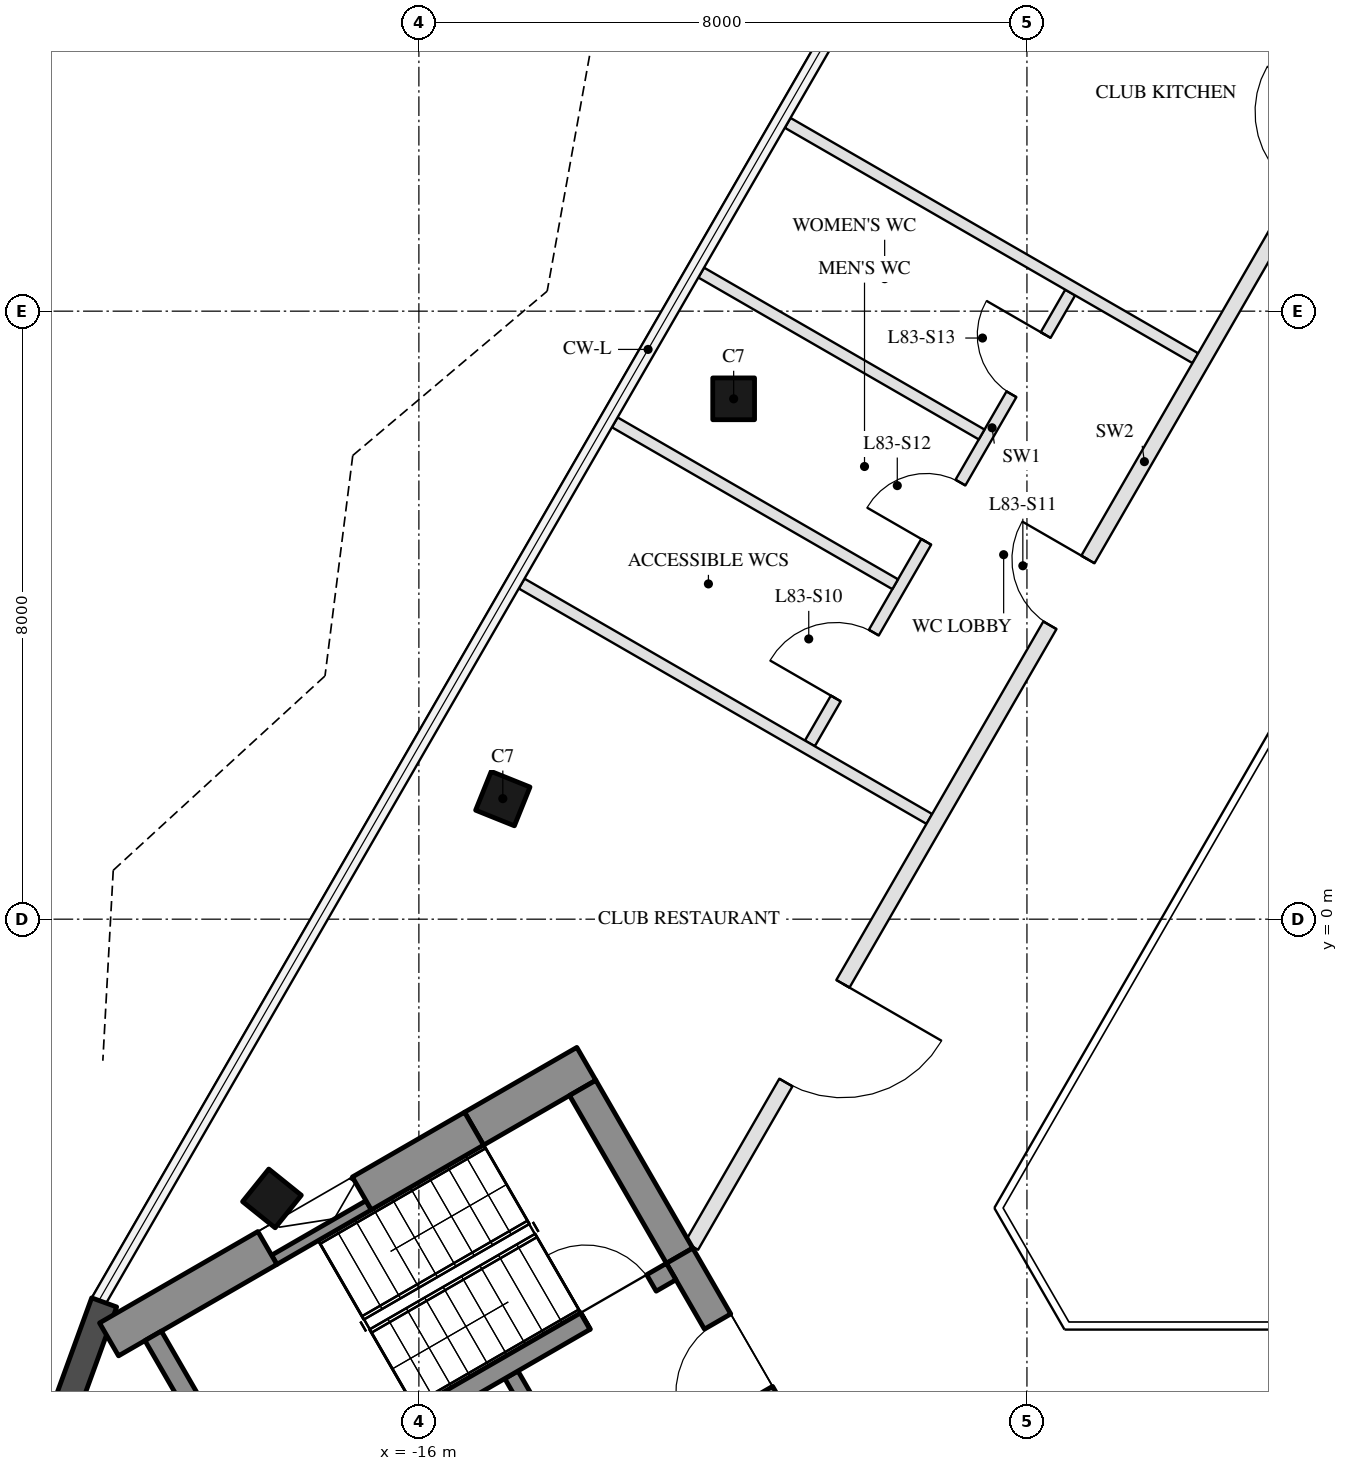
"""IFC4 building model, lengths in metres.
Left out: names, types, materials, properties, quantities, classifications, styles, units other than length and angle.
Written with IfcOpenShell. Run it as: python <this file> out.ifc"""

import sys

from ifc_helpers import new_model, si_unit, direction, frame, frame_2d, origin, origin_2d, place, context, subcontext, project, spatial, rectangle, hollow_rectangle, extrude, boolean, halfspace, element, fill, save


model = new_model("IFC4")
c1 = context("Model", 3, precision=1e-05, world=origin(), true_north=direction((0.0, 1.0)))
c2 = subcontext(c1, "Body", "Model", "MODEL_VIEW")
j1 = project(units=[si_unit("LENGTHUNIT", "METRE"), si_unit("PLANEANGLEUNIT", "RADIAN")], contexts=[c1])
p1 = place(None, origin())
s1 = spatial("IfcSite", under=j1, at=p1, CompositionType="ELEMENT")
p2 = place(p1, origin())
s2 = spatial("IfcBuilding", under=s1, at=p2, CompositionType="ELEMENT")
p3 = place(p2, frame((0.0, 0.0, 331.8)))
s3 = spatial("IfcBuildingStorey", under=s2, at=p3, CompositionType="ELEMENT", Elevation=331.8)
p4 = place(p3, frame((-8.822, 12.107, 0.0), z_axis=(0.057738040202, -0.073705749506, 0.995607242442), x_axis=(0.501061537175, 0.864705350939, 0.034957002453)))
e1 = element("IfcColumn", 1, at=p4, inside=s3, PredefinedType="COLUMN", context=c2, shape_type="SweptSolid", body=[
    boolean("DIFFERENCE", boolean("DIFFERENCE", extrude(hollow_rectangle(XDim=0.55, YDim=0.55, WallThickness=0.025, at=origin_2d()), origin(), (0.0, 0.0, 1.0), 6.529), halfspace(frame((0.0, 0.0, 0.016), z_axis=(0.0, 0.0, 1.0), x_axis=(1.0, 0.0, 0.0)), True)), halfspace(frame((0.0, 0.0, 6.509), z_axis=(0.0, 0.0, 1.0), x_axis=(1.0, 0.0, 0.0)), False)),
])
p5 = place(p3, frame((-11.859, 6.847, 0.0), z_axis=(0.075247573053, -0.043479701585, 0.99621650172), x_axis=(-0.500351454226, -0.865822396472, 4.550396e-06)))
e2 = element("IfcColumn", 2, at=p5, inside=s3, PredefinedType="COLUMN", context=c2, shape_type="SweptSolid", body=[
    boolean("DIFFERENCE", boolean("DIFFERENCE", extrude(hollow_rectangle(XDim=0.55, YDim=0.55, WallThickness=0.025, at=origin_2d()), origin(), (0.0, 0.0, 1.0), 6.525), halfspace(frame((0.0, 0.0, 0.015), z_axis=(0.0, 0.0, 1.0), x_axis=(1.0, 0.0, 0.0)), True)), halfspace(frame((0.0, 0.0, 6.506), z_axis=(0.0, 0.0, 1.0), x_axis=(1.0, 0.0, 0.0)), False)),
])
p6 = place(p3, frame((-14.896, 1.586, 0.0), z_axis=(0.092702425399, -0.013163071295, 0.995606847043), x_axis=(-0.498429944547, -0.86622490994, 0.034957056199)))
e3 = element("IfcColumn", 3, at=p6, inside=s3, PredefinedType="COLUMN", context=c2, shape_type="SweptSolid", body=[
    boolean("DIFFERENCE", boolean("DIFFERENCE", extrude(hollow_rectangle(XDim=0.55, YDim=0.55, WallThickness=0.025, at=origin_2d()), origin(), (0.0, 0.0, 1.0), 6.529), halfspace(frame((0.0, 0.0, 0.016), z_axis=(0.0, 0.0, 1.0), x_axis=(1.0, 0.0, 0.0)), True)), halfspace(frame((0.0, 0.0, 6.509), z_axis=(0.0, 0.0, 1.0), x_axis=(1.0, 0.0, 0.0)), False)),
])
p7 = place(p3, frame((-17.933, -3.674, 0.0), z_axis=(0.110001598566, 0.017095599641, 0.993784377411), x_axis=(-0.496031401637, -0.865495011969, 0.069794217853)))
e4 = element("IfcColumn", 4, at=p7, inside=s3, PredefinedType="COLUMN", context=c2, shape_type="SweptSolid", body=[
    boolean("DIFFERENCE", boolean("DIFFERENCE", extrude(hollow_rectangle(XDim=0.55, YDim=0.55, WallThickness=0.025, at=origin_2d()), origin(), (0.0, 0.0, 1.0), 6.541), halfspace(frame((0.0, 0.0, 0.018), z_axis=(0.0, 0.0, 1.0), x_axis=(1.0, 0.0, 0.0)), True)), halfspace(frame((0.0, 0.0, 6.517), z_axis=(0.0, 0.0, 1.0), x_axis=(1.0, 0.0, 0.0)), False)),
])
p8 = place(p3, frame((-20.14, -5.042, 0.0), z_axis=(0.0, 0.0, 1.0), x_axis=(-0.341943264121, -0.939720598967, 0.0)))
e5 = element("IfcWall", 5, at=p8, inside=s3, PredefinedType="SOLIDWALL", context=c2, shape_type="SweptSolid", body=[
    extrude(rectangle(XDim=1.469, YDim=0.35, at=frame_2d((0.734, 0.0))), origin(), (0.0, 0.0, 1.0), 6.25),
])
p9 = place(p3, frame((-16.66, -3.765, 0.0), z_axis=(0.0, 0.0, 1.0), x_axis=(-0.866077922096, -0.499909024581, 0.0)))
e6 = element("IfcWall", 6, at=p9, inside=s3, PredefinedType="SHEAR", context=c2, shape_type="SweptSolid", body=[
    extrude(rectangle(XDim=1.435, YDim=0.14, at=frame_2d((0.717, 0.0))), origin(), (0.0, 0.0, 1.0), 6.25),
])
p10 = place(p3, frame((-17.993, -4.326, 0.0), z_axis=(0.0, 0.0, 1.0), x_axis=(-0.866030114221, -0.499991841196, 0.0)))
e7 = element("IfcWall", 7, at=p10, inside=s3, PredefinedType="SHEAR", context=c2, shape_type="SweptSolid", body=[
    extrude(rectangle(XDim=2.406, YDim=0.5, at=frame_2d((1.203, 0.0))), origin(), (0.0, 0.0, 1.0), 6.25),
])
p11 = place(p3, frame((-19.496, -5.482, 0.0), z_axis=(0.0, 0.0, 1.0), x_axis=(0.499990435942, -0.866030925526, 0.0)))
e8 = element("IfcWall", 8, at=p11, inside=s3, PredefinedType="SHEAR", context=c2, shape_type="SweptSolid", body=[
    extrude(rectangle(XDim=2.55, YDim=0.25, at=frame_2d((1.275, 0.0))), origin(), (0.0, 0.0, 1.0), 6.25),
])
p12 = place(p3, frame((-14.783, -5.995, 0.0), z_axis=(0.0, 0.0, 1.0), x_axis=(0.49994636267, -0.866056369097, 0.0)))
e9 = element("IfcWall", 9, at=p12, inside=s3, PredefinedType="SHEAR", context=c2, shape_type="SweptSolid", body=[
    extrude(rectangle(XDim=2.8, YDim=0.2, at=frame_2d((1.4, 0.0))), origin(), (0.0, 0.0, 1.0), 6.25),
])
p13 = place(p12, frame((0.7, 0.0, 0.0)))
e10 = element("IfcOpeningElement", 10, at=p13, cuts=e9, PredefinedType="OPENING", context=c2, shape_type="SweptSolid", body=[
    extrude(rectangle(XDim=1.2, YDim=2.1, at=frame_2d((0.6, 1.05))), frame((0.0, 0.11, 0.0), z_axis=(0.0, -1.0, 0.0), x_axis=(1.0, 0.0, 0.0)), (0.0, 0.0, 1.0), 0.22),
])
p14 = place(p3, frame((-13.797, -1.903, 0.0), z_axis=(0.0, 0.0, 1.0), x_axis=(-0.866033076574, -0.499986710104, 0.0)))
e11 = element("IfcWall", 11, at=p14, inside=s3, PredefinedType="SHEAR", context=c2, shape_type="SweptSolid", body=[
    extrude(rectangle(XDim=1.706, YDim=0.5, at=frame_2d((0.853, 0.0))), origin(), (0.0, 0.0, 1.0), 6.25),
])
p15 = place(p3, frame((-15.274, -2.756, 0.0), z_axis=(0.0, 0.0, 1.0), x_axis=(-0.866040105854, -0.499974534403, 0.0)))
e12 = element("IfcWall", 12, at=p15, inside=s3, PredefinedType="SHEAR", context=c2, shape_type="SweptSolid", body=[
    extrude(rectangle(XDim=1.705, YDim=0.5, at=frame_2d((0.852, 0.0))), origin(), (0.0, 0.0, 1.0), 6.25),
])
p16 = place(p3, frame((-13.845, -2.22, 0.0), z_axis=(0.0, 0.0, 1.0), x_axis=(0.500062241894, -0.865989465428, 0.0)))
e13 = element("IfcWall", 13, at=p16, inside=s3, PredefinedType="SHEAR", context=c2, shape_type="SweptSolid", body=[
    extrude(rectangle(XDim=2.55, YDim=0.4, at=frame_2d((1.275, 0.0))), origin(), (0.0, 0.0, 1.0), 6.25),
])
p17 = place(p3, frame((-12.57, -4.428, 0.0), z_axis=(0.0, 0.0, 1.0), x_axis=(0.499984378957, -0.86603442241, 0.0)))
e14 = element("IfcWall", 14, at=p17, inside=s3, PredefinedType="SHEAR", context=c2, shape_type="SweptSolid", body=[
    extrude(rectangle(XDim=7.45, YDim=0.4, at=frame_2d((3.725, 0.0))), origin(), (0.0, 0.0, 1.0), 6.25),
])
p18 = place(p17, frame((1.0, 0.0, 0.0)))
e15 = element("IfcOpeningElement", 15, at=p18, cuts=e14, PredefinedType="OPENING", context=c2, shape_type="SweptSolid", body=[
    extrude(rectangle(XDim=1.1, YDim=2.1, at=frame_2d((0.55, 1.05))), frame((0.0, 0.21, 0.0), z_axis=(0.0, -1.0, 0.0), x_axis=(1.0, 0.0, 0.0)), (0.0, 0.0, 1.0), 0.42),
])
p19 = place(p17, frame((3.3, 0.0, 0.0)))
e16 = element("IfcOpeningElement", 16, at=p19, cuts=e14, PredefinedType="OPENING", context=c2, shape_type="SweptSolid", body=[
    extrude(rectangle(XDim=1.4, YDim=2.1, at=frame_2d((0.7, 1.05))), frame((0.0, 0.21, 0.0), z_axis=(0.0, -1.0, 0.0), x_axis=(1.0, 0.0, 0.0)), (0.0, 0.0, 1.0), 0.42),
])
p20 = place(p3, frame((-12.681, -4.636, 0.0), z_axis=(0.0, 0.0, 1.0), x_axis=(-0.86601437931, -0.500019094464, 0.0)))
e17 = element("IfcWall", 17, at=p20, inside=s3, PredefinedType="SHEAR", context=c2, shape_type="SweptSolid", body=[
    extrude(rectangle(XDim=1.306, YDim=0.25, at=frame_2d((0.653, 0.0))), origin(), (0.0, 0.0, 1.0), 6.25),
])
p21 = place(p20, frame((0.3, 0.0, 0.0)))
e18 = element("IfcOpeningElement", 18, at=p21, cuts=e17, PredefinedType="OPENING", context=c2, shape_type="SweptSolid", body=[
    extrude(rectangle(XDim=1.0, YDim=2.1, at=frame_2d((0.5, 1.05))), frame((0.0, 0.135, 0.0), z_axis=(0.0, -1.0, 0.0), x_axis=(1.0, 0.0, 0.0)), (0.0, 0.0, 1.0), 0.27),
])
p22 = place(p3, frame((-13.812, -5.29, 0.0), z_axis=(0.0, 0.0, 1.0), x_axis=(-0.866023561601, -0.500003190742, 0.0)))
e19 = element("IfcWall", 19, at=p22, inside=s3, PredefinedType="SHEAR", context=c2, shape_type="SweptSolid", body=[
    extrude(rectangle(XDim=5.144, YDim=0.25, at=frame_2d((2.572, 0.0))), origin(), (0.0, 0.0, 1.0), 6.25),
])
p23 = place(p3, frame((-7.431, 8.245, 0.0), z_axis=(0.0, 0.0, 1.0), x_axis=(-0.500014519185, -0.866017020967, 0.0)))
e20 = element("IfcWall", 20, at=p23, inside=s3, PredefinedType="PARTITIONING", context=c2, shape_type="SweptSolid", body=[
    extrude(rectangle(XDim=6.85, YDim=0.15, at=frame_2d((3.425, 0.0))), origin(), (0.0, 0.0, 1.0), 5.85),
])
p24 = place(p23, frame((5.167, 0.0, 0.0)))
e21 = element("IfcOpeningElement", 21, at=p24, cuts=e20, PredefinedType="OPENING", context=c2, shape_type="SweptSolid", body=[
    extrude(rectangle(XDim=1.0, YDim=2.1, at=frame_2d((0.5, 1.05))), frame((0.0, 0.085, 0.0), z_axis=(0.0, -1.0, 0.0), x_axis=(1.0, 0.0, 0.0)), (0.0, 0.0, 1.0), 0.17),
])
p25 = place(p23, frame((2.887, 0.0, 0.0)))
e22 = element("IfcOpeningElement", 22, at=p25, cuts=e20, PredefinedType="OPENING", context=c2, shape_type="SweptSolid", body=[
    extrude(rectangle(XDim=0.9, YDim=2.1, at=frame_2d((0.45, 1.05))), frame((0.0, 0.085, 0.0), z_axis=(0.0, -1.0, 0.0), x_axis=(1.0, 0.0, 0.0)), (0.0, 0.0, 1.0), 0.17),
])
p26 = place(p23, frame((0.646, 0.0, 0.0)))
e23 = element("IfcOpeningElement", 23, at=p26, cuts=e20, PredefinedType="OPENING", context=c2, shape_type="SweptSolid", body=[
    extrude(rectangle(XDim=0.9, YDim=2.1, at=frame_2d((0.45, 1.05))), frame((0.0, 0.085, 0.0), z_axis=(0.0, -1.0, 0.0), x_axis=(1.0, 0.0, 0.0)), (0.0, 0.0, 1.0), 0.17),
])
p27 = place(p3, frame((-11.148, 10.478, 0.0), z_axis=(0.0, 0.0, 1.0), x_axis=(0.866022127522, -0.500005674609, 0.0)))
e24 = element("IfcWall", 24, at=p27, inside=s3, PredefinedType="PARTITIONING", context=c2, shape_type="SweptSolid", body=[
    extrude(rectangle(XDim=6.193, YDim=0.15, at=frame_2d((3.097, 0.0))), origin(), (0.0, 0.0, 1.0), 5.85),
])
p28 = place(p3, frame((-12.285, 8.508, 0.0), z_axis=(0.0, 0.0, 1.0), x_axis=(0.866023350811, -0.500003555838, 0.0)))
e25 = element("IfcWall", 25, at=p28, inside=s3, PredefinedType="PARTITIONING", context=c2, shape_type="SweptSolid", body=[
    extrude(rectangle(XDim=4.26, YDim=0.15, at=frame_2d((2.13, 0.0))), origin(), (0.0, 0.0, 1.0), 5.85),
])
p29 = place(p3, frame((-13.423, 6.537, 0.0), z_axis=(0.0, 0.0, 1.0), x_axis=(0.866037676697, -0.499978742089, 0.0)))
e26 = element("IfcWall", 26, at=p29, inside=s3, PredefinedType="PARTITIONING", context=c2, shape_type="SweptSolid", body=[
    extrude(rectangle(XDim=4.26, YDim=0.15, at=frame_2d((2.13, 0.0))), origin(), (0.0, 0.0, 1.0), 5.85),
])
p30 = place(p3, frame((-14.648, 4.416, 0.0), z_axis=(0.0, 0.0, 1.0), x_axis=(0.866022127522, -0.500005674609, 0.0)))
e27 = element("IfcWall", 27, at=p30, inside=s3, PredefinedType="PARTITIONING", context=c2, shape_type="SweptSolid", body=[
    extrude(rectangle(XDim=6.193, YDim=0.15, at=frame_2d((3.097, 0.0))), origin(), (0.0, 0.0, 1.0), 5.85),
])
p31 = place(p3, frame((-2.482, 12.9, 0.0), z_axis=(0.0, 0.0, 1.0), x_axis=(-0.50000478328, -0.866022642139, 0.0)))
e28 = element("IfcWall", 28, at=p31, inside=s3, PredefinedType="PARTITIONING", context=c2, shape_type="SweptSolid", body=[
    extrude(rectangle(XDim=19.861, YDim=0.2, at=frame_2d((9.931, 0.0))), origin(), (0.0, 0.0, 1.0), 5.85),
])
p32 = place(p31, frame((2.634, 0.0, 0.0)))
e29 = element("IfcOpeningElement", 29, at=p32, cuts=e28, PredefinedType="OPENING", context=c2, shape_type="SweptSolid", body=[
    extrude(rectangle(XDim=1.2, YDim=2.1, at=frame_2d((0.6, 1.05))), frame((0.0, 0.11, 0.0), z_axis=(0.0, -1.0, 0.0), x_axis=(1.0, 0.0, 0.0)), (0.0, 0.0, 1.0), 0.22),
])
p33 = place(p31, frame((15.877, 0.0, 0.0)))
e30 = element("IfcOpeningElement", 30, at=p33, cuts=e28, PredefinedType="OPENING", context=c2, shape_type="SweptSolid", body=[
    extrude(rectangle(XDim=1.5, YDim=2.1, at=frame_2d((0.75, 1.05))), frame((0.0, 0.11, 0.0), z_axis=(0.0, -1.0, 0.0), x_axis=(1.0, 0.0, 0.0)), (0.0, 0.0, 1.0), 0.22),
])
p34 = place(p31, frame((9.43, 0.0, 0.0)))
e31 = element("IfcOpeningElement", 31, at=p34, cuts=e28, PredefinedType="OPENING", context=c2, shape_type="SweptSolid", body=[
    extrude(rectangle(XDim=1.0, YDim=2.1, at=frame_2d((0.5, 1.05))), frame((0.0, 0.11, 0.0), z_axis=(0.0, -1.0, 0.0), x_axis=(1.0, 0.0, 0.0)), (0.0, 0.0, 1.0), 0.22),
])
p35 = place(p18, frame((1.1, 0.0, 0.0), z_axis=(0.0, 0.0, 1.0), x_axis=(-1.0, 0.0, 0.0)))
e32 = element("IfcDoor", 32, at=p35, inside=s3, OperationType="SINGLE_SWING_LEFT", PredefinedType="DOOR", context=c2, shape_type="SweptSolid", body=[
    extrude(rectangle(XDim=1.1, YDim=2.1, at=frame_2d((0.55, 1.05))), frame((0.0, 0.025, 0.0), z_axis=(0.0, -1.0, 0.0), x_axis=(1.0, 0.0, 0.0)), (0.0, 0.0, 1.0), 0.05),
])
fill(e15, e32)
p36 = place(p21, frame((1.0, 0.0, 0.0), z_axis=(0.0, 0.0, 1.0), x_axis=(-1.0, 0.0, 0.0)))
e33 = element("IfcDoor", 33, at=p36, inside=s3, OperationType="SINGLE_SWING_LEFT", PredefinedType="DOOR", context=c2, shape_type="SweptSolid", body=[
    extrude(rectangle(XDim=1.0, YDim=2.1, at=frame_2d((0.5, 1.05))), frame((0.0, 0.025, 0.0), z_axis=(0.0, -1.0, 0.0), x_axis=(1.0, 0.0, 0.0)), (0.0, 0.0, 1.0), 0.05),
])
fill(e18, e33)
p37 = place(p33, origin())
e34 = element("IfcDoor", 34, at=p37, inside=s3, OperationType="DOUBLE_DOOR_SINGLE_SWING", PredefinedType="DOOR", context=c2, shape_type="SweptSolid", body=[
    extrude(rectangle(XDim=1.5, YDim=2.1, at=frame_2d((0.75, 1.05))), frame((0.0, 0.025, 0.0), z_axis=(0.0, -1.0, 0.0), x_axis=(1.0, 0.0, 0.0)), (0.0, 0.0, 1.0), 0.05),
])
fill(e30, e34)
p38 = place(p24, frame((1.0, 0.0, 0.0), z_axis=(0.0, 0.0, 1.0), x_axis=(-1.0, 0.0, 0.0)))
e35 = element("IfcDoor", 35, at=p38, inside=s3, OperationType="SINGLE_SWING_LEFT", PredefinedType="DOOR", context=c2, shape_type="SweptSolid", body=[
    extrude(rectangle(XDim=1.0, YDim=2.1, at=frame_2d((0.5, 1.05))), frame((0.0, 0.025, 0.0), z_axis=(0.0, -1.0, 0.0), x_axis=(1.0, 0.0, 0.0)), (0.0, 0.0, 1.0), 0.05),
])
fill(e21, e35)
p39 = place(p34, frame((1.0, 0.0, 0.0), z_axis=(0.0, 0.0, 1.0), x_axis=(-1.0, 0.0, 0.0)))
e36 = element("IfcDoor", 36, at=p39, inside=s3, OperationType="SINGLE_SWING_RIGHT", PredefinedType="DOOR", context=c2, shape_type="SweptSolid", body=[
    extrude(rectangle(XDim=1.0, YDim=2.1, at=frame_2d((0.5, 1.05))), frame((0.0, 0.025, 0.0), z_axis=(0.0, -1.0, 0.0), x_axis=(1.0, 0.0, 0.0)), (0.0, 0.0, 1.0), 0.05),
])
fill(e31, e36)
p40 = place(p25, frame((0.9, 0.0, 0.0), z_axis=(0.0, 0.0, 1.0), x_axis=(-1.0, 0.0, 0.0)))
e37 = element("IfcDoor", 37, at=p40, inside=s3, OperationType="SINGLE_SWING_LEFT", PredefinedType="DOOR", context=c2, shape_type="SweptSolid", body=[
    extrude(rectangle(XDim=0.9, YDim=2.1, at=frame_2d((0.45, 1.05))), frame((0.0, 0.025, 0.0), z_axis=(0.0, -1.0, 0.0), x_axis=(1.0, 0.0, 0.0)), (0.0, 0.0, 1.0), 0.05),
])
fill(e22, e37)
p41 = place(p26, frame((0.9, 0.0, 0.0), z_axis=(0.0, 0.0, 1.0), x_axis=(-1.0, 0.0, 0.0)))
e38 = element("IfcDoor", 38, at=p41, inside=s3, OperationType="SINGLE_SWING_RIGHT", PredefinedType="DOOR", context=c2, shape_type="SweptSolid", body=[
    extrude(rectangle(XDim=0.9, YDim=2.1, at=frame_2d((0.45, 1.05))), frame((0.0, 0.025, 0.0), z_axis=(0.0, -1.0, 0.0), x_axis=(1.0, 0.0, 0.0)), (0.0, 0.0, 1.0), 0.05),
])
fill(e23, e38)
save(model, sys.argv[1])
